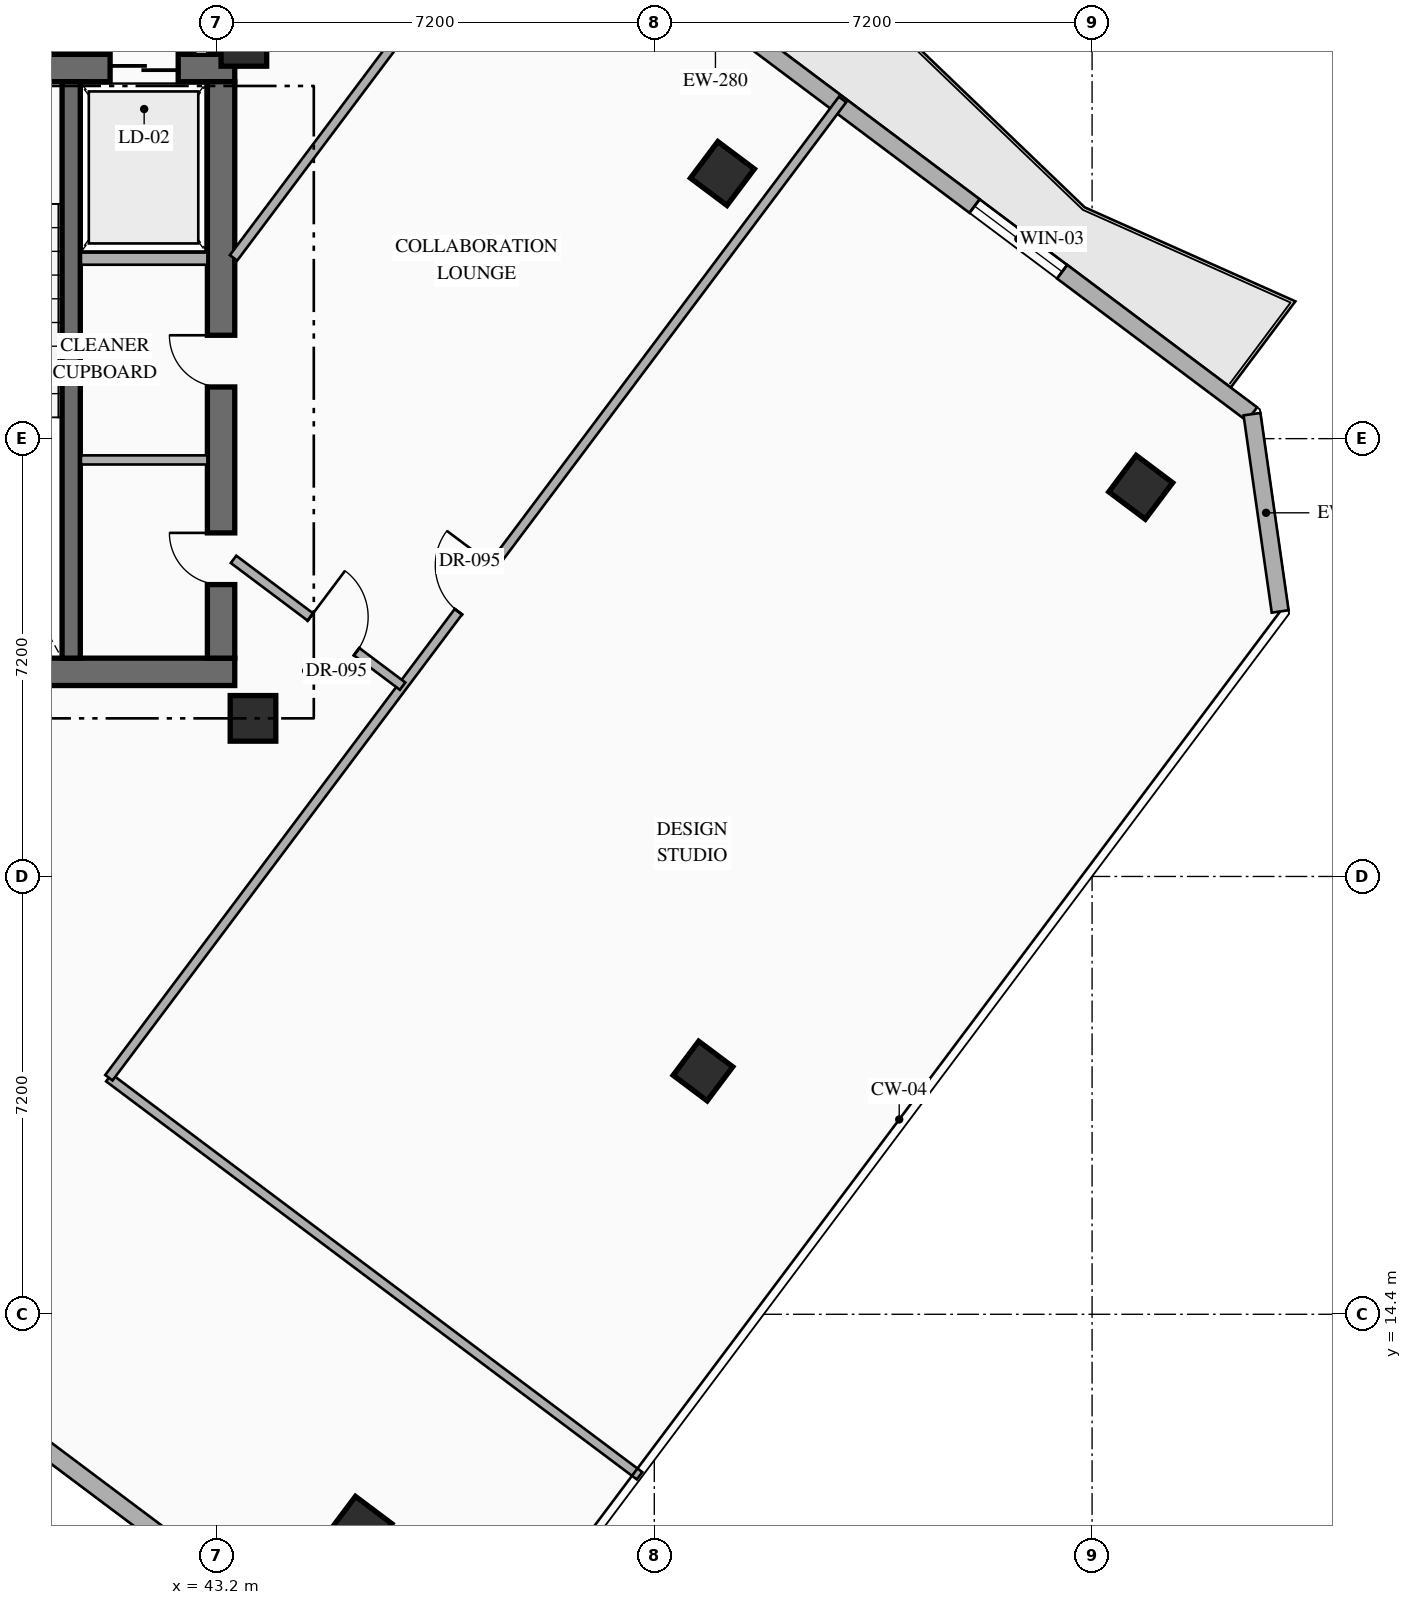
"""IFC4 building model, lengths in metres.
Left out: names, types, materials, properties, quantities, classifications, styles, units other than length and angle.
Written with IfcOpenShell. Run it as: python <this file> out.ifc"""

import sys

from ifc_helpers import new_model, si_unit, direction, frame, frame_2d, origin, origin_2d, place, context, subcontext, project, spatial, rectangle, hollow_rectangle, extrude, element, fill, save


model = new_model("IFC4")
c1 = context("Model", 3, precision=1e-05, world=origin(), true_north=direction((0.0, 1.0)))
c2 = subcontext(c1, "Body", "Model", "MODEL_VIEW")
j1 = project(units=[si_unit("LENGTHUNIT", "METRE"), si_unit("PLANEANGLEUNIT", "RADIAN")], contexts=[c1])
p1 = place(None, origin())
s1 = spatial("IfcSite", under=j1, at=p1, CompositionType="ELEMENT")
p2 = place(p1, origin())
s2 = spatial("IfcBuilding", under=s1, at=p2, CompositionType="ELEMENT")
p3 = place(p2, frame((0.0, 0.0, 191.55)))
s3 = spatial("IfcBuildingStorey", under=s2, at=p3, CompositionType="ELEMENT", Elevation=191.55)
p4 = place(p3, frame((36.04, 24.965, 0.0), z_axis=(0.0, 0.0, 1.0), x_axis=(1.0, 0.0, 0.0)))
e1 = element("IfcWall", 1, at=p4, inside=s3, PredefinedType="SHEAR", context=c2, shape_type="SweptSolid", body=[
    extrude(rectangle(XDim=7.46, YDim=0.45, at=frame_2d((3.73, 0.0))), origin(), (0.0, 0.0, 1.0), 3.6),
])
p5 = place(p3, frame((36.04, 34.895, 0.0), z_axis=(0.0, 0.0, 1.0), x_axis=(1.0, 0.0, 0.0)))
e2 = element("IfcWall", 2, at=p5, inside=s3, PredefinedType="SHEAR", context=c2, shape_type="SweptSolid", body=[
    extrude(rectangle(XDim=7.46, YDim=0.45, at=frame_2d((3.73, 0.0))), origin(), (0.0, 0.0, 1.0), 3.6),
])
p6 = place(p5, frame((2.51, 0.0, 0.0)))
e3 = element("IfcOpeningElement", 3, at=p6, cuts=e2, PredefinedType="OPENING", context=c2, shape_type="SweptSolid", body=[
    extrude(rectangle(XDim=1.1, YDim=2.2, at=frame_2d((0.55, 1.1))), frame((0.0, 0.235, 0.0), z_axis=(0.0, -1.0, 0.0), x_axis=(1.0, 0.0, 0.0)), (0.0, 0.0, 1.0), 0.47),
])
p7 = place(p5, frame((5.41, 0.0, 0.0)))
e4 = element("IfcOpeningElement", 4, at=p7, cuts=e2, PredefinedType="OPENING", context=c2, shape_type="SweptSolid", body=[
    extrude(rectangle(XDim=1.12, YDim=2.15, at=frame_2d((0.56, 1.075))), frame((0.0, 0.235, 0.0), z_axis=(0.0, -1.0, 0.0), x_axis=(1.0, 0.0, 0.0)), (0.0, 0.0, 1.0), 0.47),
])
p8 = place(p3, frame((43.275, 25.19, 0.0), z_axis=(0.0, 0.0, 1.0), x_axis=(0.0, 1.0, 0.0)))
e5 = element("IfcWall", 5, at=p8, inside=s3, PredefinedType="SHEAR", context=c2, shape_type="SweptSolid", body=[
    extrude(rectangle(XDim=9.48, YDim=0.45, at=frame_2d((4.74, 0.0))), origin(), (0.0, 0.0, 1.0), 3.6),
])
p9 = place(p8, frame((1.21, 0.0, 0.0)))
e6 = element("IfcOpeningElement", 6, at=p9, cuts=e5, PredefinedType="OPENING", context=c2, shape_type="SweptSolid", body=[
    extrude(rectangle(XDim=0.85, YDim=2.08, at=frame_2d((0.425, 1.04))), frame((0.0, 0.235, 0.0), z_axis=(0.0, -1.0, 0.0), x_axis=(1.0, 0.0, 0.0)), (0.0, 0.0, 1.0), 0.47),
])
p10 = place(p8, frame((4.46, 0.0, 0.0)))
e7 = element("IfcOpeningElement", 7, at=p10, cuts=e5, PredefinedType="OPENING", context=c2, shape_type="SweptSolid", body=[
    extrude(rectangle(XDim=0.85, YDim=2.08, at=frame_2d((0.425, 1.04))), frame((0.0, 0.235, 0.0), z_axis=(0.0, -1.0, 0.0), x_axis=(1.0, 0.0, 0.0)), (0.0, 0.0, 1.0), 0.47),
])
p11 = place(p3, frame((40.81, 25.19, 0.0), z_axis=(0.0, 0.0, 1.0), x_axis=(0.0, 1.0, 0.0)))
e8 = element("IfcWall", 8, at=p11, inside=s3, PredefinedType="SHEAR", context=c2, shape_type="SweptSolid", body=[
    extrude(rectangle(XDim=9.48, YDim=0.3, at=frame_2d((4.74, 0.0))), origin(), (0.0, 0.0, 1.0), 3.6),
])
for number, where, z_axis, x_axis in (
    (9, (43.8, 24.2, 0.0), (0.0, 0.0, 1.0), (1.0, 0.0, 0.0)),
    (10, (43.65, 35.3, 0.0), (0.0, 0.0, 1.0), (1.0, 0.0, 0.0)),
    (11, (51.52, 33.16, 0.0), (0.0, 0.0, 1.0), (0.8, -0.6, 0.0)),
    (12, (45.56, 10.88, 0.0), (0.0, 0.0, 1.0), (0.8, -0.6, 0.0)),
    (13, (58.4, 28.0, 0.0), (0.0, 0.0, 1.0), (0.8, -0.6, 0.0)),
):
    element("IfcColumn", number, at=place(p3, frame(where, z_axis=z_axis, x_axis=x_axis)), inside=s3, PredefinedType="COLUMN", context=c2, shape_type="SweptSolid", body=[
        extrude(hollow_rectangle(XDim=0.75, YDim=0.75, WallThickness=0.028, at=origin_2d()), origin(), (0.0, 0.0, 1.0), 3.6),
    ])
p12 = place(p3, frame((51.2, 18.4, 0.0), z_axis=(0.0, 0.0, 1.0), x_axis=(0.799999996291, -0.600000004945, 0.0)))
e14 = element("IfcColumn", 14, at=p12, inside=s3, PredefinedType="COLUMN", context=c2, shape_type="SweptSolid", body=[
    extrude(hollow_rectangle(XDim=0.7, YDim=0.7, WallThickness=0.028, at=origin_2d()), origin(), (0.0, 0.0, 1.0), 3.6),
])
p13 = place(p3, frame((44.86, 40.73, 0.0), z_axis=(0.0, 0.0, 1.0), x_axis=(0.800007624502, -0.599989833863, 0.0)))
e15 = element("IfcWall", 15, at=p13, inside=s3, PredefinedType="STANDARD", context=c2, shape_type="SweptSolid", body=[
    extrude(rectangle(XDim=19.212, YDim=0.28, at=frame_2d((9.606, 0.0))), origin(), (0.0, 0.0, 1.0), 3.35),
])
p14 = place(p13, frame((1.755, 0.0, 0.0)))
e16 = element("IfcOpeningElement", 16, at=p14, cuts=e15, PredefinedType="OPENING", context=c2, shape_type="SweptSolid", body=[
    extrude(rectangle(XDim=1.1, YDim=2.2, at=frame_2d((0.55, 1.1))), frame((0.0, 0.15, 0.0), z_axis=(0.0, -1.0, 0.0), x_axis=(1.0, 0.0, 0.0)), (0.0, 0.0, 1.0), 0.3),
])
p15 = place(p13, frame((13.509, 0.0, 0.85)))
e17 = element("IfcOpeningElement", 17, at=p15, cuts=e15, PredefinedType="OPENING", context=c2, shape_type="SweptSolid", body=[
    extrude(rectangle(XDim=1.8, YDim=2.1, at=frame_2d((0.9, 1.05))), frame((0.0, 0.15, 0.0), z_axis=(0.0, -1.0, 0.0), x_axis=(1.0, 0.0, 0.0)), (0.0, 0.0, 1.0), 0.3),
])
p16 = place(p3, frame((60.23, 29.203, 0.0), z_axis=(0.0, 0.0, 1.0), x_axis=(0.141296221922, -0.989967361922, 0.0)))
e18 = element("IfcWall", 18, at=p16, inside=s3, PredefinedType="STANDARD", context=c2, shape_type="SweptSolid", body=[
    extrude(rectangle(XDim=3.278, YDim=0.28, at=frame_2d((1.639, 0.0))), origin(), (0.0, 0.0, 1.0), 3.35),
])
p17 = place(p3, frame((44.918, 8.787, 0.0), z_axis=(0.0, 0.0, 1.0), x_axis=(-0.800004765927, 0.599993645378, 0.0)))
e19 = element("IfcWall", 19, at=p17, inside=s3, PredefinedType="STANDARD", context=c2, shape_type="SweptSolid", body=[
    extrude(rectangle(XDim=24.588, YDim=0.28, at=frame_2d((12.294, 0.0))), origin(), (0.0, 0.0, 1.0), 3.35),
])
p18 = place(p3, frame((40.97, 31.76, 0.0), z_axis=(0.0, 0.0, 1.0), x_axis=(1.0, 0.0, 0.0)))
e20 = element("IfcWall", 20, at=p18, inside=s3, PredefinedType="STANDARD", context=c2, shape_type="SweptSolid", body=[
    extrude(rectangle(XDim=2.08, YDim=0.2, at=frame_2d((1.04, 0.0))), origin(), (0.0, 0.0, 1.0), 3.35),
])
p19 = place(p3, frame((40.97, 28.45, 0.0), z_axis=(0.0, 0.0, 1.0), x_axis=(1.0, 0.0, 0.0)))
e21 = element("IfcWall", 21, at=p19, inside=s3, PredefinedType="PARTITIONING", context=c2, shape_type="SweptSolid", body=[
    extrude(rectangle(XDim=2.08, YDim=0.15, at=frame_2d((1.04, 0.0))), origin(), (0.0, 0.0, 1.0), 3.35),
])
p20 = place(p3, frame((42.95, 35.12, 0.0), z_axis=(0.0, 0.0, 1.0), x_axis=(0.0, 1.0, 0.0)))
e22 = element("IfcWall", 22, at=p20, inside=s3, PredefinedType="STANDARD", context=c2, shape_type="SweptSolid", body=[
    extrude(rectangle(XDim=2.98, YDim=0.2, at=frame_2d((1.49, 0.0))), origin(), (0.0, 0.0, 1.0), 3.35),
])
p21 = place(p3, frame((41.43, 18.29, 0.0), z_axis=(0.0, 0.0, 1.0), x_axis=(0.799994629375, -0.600007160767, 0.0)))
e23 = element("IfcWall", 23, at=p21, inside=s3, PredefinedType="PARTITIONING", context=c2, shape_type="SweptSolid", body=[
    extrude(rectangle(XDim=10.91, YDim=0.15, at=frame_2d((5.455, 0.0))), origin(), (0.0, 0.0, 1.0), 3.35),
])
p22 = place(p3, frame((41.43, 18.29, 0.0), z_axis=(0.0, 0.0, 1.0), x_axis=(0.600007769734, 0.79999417264, 0.0)))
e24 = element("IfcWall", 24, at=p22, inside=s3, PredefinedType="PARTITIONING", context=c2, shape_type="SweptSolid", body=[
    extrude(rectangle(XDim=20.11, YDim=0.15, at=frame_2d((10.055, 0.0))), origin(), (0.0, 0.0, 1.0), 3.35),
])
p23 = place(p22, frame((9.58, 0.0, 0.0)))
e25 = element("IfcOpeningElement", 25, at=p23, cuts=e24, PredefinedType="OPENING", context=c2, shape_type="SweptSolid", body=[
    extrude(rectangle(XDim=0.95, YDim=2.15, at=frame_2d((0.475, 1.075))), frame((0.0, 0.085, 0.0), z_axis=(0.0, -1.0, 0.0), x_axis=(1.0, 0.0, 0.0)), (0.0, 0.0, 1.0), 0.17),
])
p24 = place(p3, frame((43.48, 26.815, 0.0), z_axis=(0.0, 0.0, 1.0), x_axis=(0.800008430676, -0.599988758934, 0.0)))
e26 = element("IfcWall", 26, at=p24, inside=s3, PredefinedType="PARTITIONING", context=c2, shape_type="SweptSolid", body=[
    extrude(rectangle(XDim=3.475, YDim=0.15, at=frame_2d((1.738, 0.0))), origin(), (0.0, 0.0, 1.0), 3.35),
])
p25 = place(p24, frame((1.58, 0.0, 0.0)))
e27 = element("IfcOpeningElement", 27, at=p25, cuts=e26, PredefinedType="OPENING", context=c2, shape_type="SweptSolid", body=[
    extrude(rectangle(XDim=0.95, YDim=2.15, at=frame_2d((0.475, 1.075))), frame((0.0, 0.085, 0.0), z_axis=(0.0, -1.0, 0.0), x_axis=(1.0, 0.0, 0.0)), (0.0, 0.0, 1.0), 0.17),
])
p26 = place(p3, frame((43.48, 31.773, 0.0), z_axis=(0.0, 0.0, 1.0), x_axis=(0.599971041729, 0.800021717885, 0.0)))
e28 = element("IfcWall", 28, at=p26, inside=s3, PredefinedType="PARTITIONING", context=c2, shape_type="SweptSolid", body=[
    extrude(rectangle(XDim=8.094, YDim=0.15, at=frame_2d((4.047, 0.0))), origin(), (0.0, 0.0, 1.0), 3.35),
])
p27 = place(p15, origin())
e29 = element("IfcWindow", 29, at=p27, inside=s3, PartitioningType="SINGLE_PANEL", PredefinedType="WINDOW", context=c2, shape_type="SweptSolid", body=[
    extrude(rectangle(XDim=1.8, YDim=2.1, at=frame_2d((0.9, 1.05))), frame((0.0, 0.03, 0.0), z_axis=(0.0, -1.0, 0.0), x_axis=(1.0, 0.0, 0.0)), (0.0, 0.0, 1.0), 0.06),
])
fill(e17, e29)
p28 = place(p7, origin())
e30 = element("IfcDoor", 30, at=p28, inside=s3, OperationType="SLIDING_TO_RIGHT", PredefinedType="USERDEFINED", context=c2, shape_type="SweptSolid", body=[
    extrude(rectangle(XDim=1.12, YDim=2.15, at=frame_2d((0.56, 1.075))), frame((0.0, 0.025, 0.0), z_axis=(0.0, -1.0, 0.0), x_axis=(1.0, 0.0, 0.0)), (0.0, 0.0, 1.0), 0.05),
])
fill(e4, e30)
p29 = place(p9, origin())
e31 = element("IfcDoor", 31, at=p29, inside=s3, OperationType="SINGLE_SWING_RIGHT", PredefinedType="DOOR", context=c2, shape_type="SweptSolid", body=[
    extrude(rectangle(XDim=0.85, YDim=2.08, at=frame_2d((0.425, 1.04))), frame((0.0, 0.025, 0.0), z_axis=(0.0, -1.0, 0.0), x_axis=(1.0, 0.0, 0.0)), (0.0, 0.0, 1.0), 0.05),
])
fill(e6, e31)
p30 = place(p10, origin())
e32 = element("IfcDoor", 32, at=p30, inside=s3, OperationType="SINGLE_SWING_RIGHT", PredefinedType="DOOR", context=c2, shape_type="SweptSolid", body=[
    extrude(rectangle(XDim=0.85, YDim=2.08, at=frame_2d((0.425, 1.04))), frame((0.0, 0.025, 0.0), z_axis=(0.0, -1.0, 0.0), x_axis=(1.0, 0.0, 0.0)), (0.0, 0.0, 1.0), 0.05),
])
fill(e7, e32)
p31 = place(p23, origin())
e33 = element("IfcDoor", 33, at=p31, inside=s3, OperationType="SINGLE_SWING_RIGHT", PredefinedType="DOOR", context=c2, shape_type="SweptSolid", body=[
    extrude(rectangle(XDim=0.95, YDim=2.15, at=frame_2d((0.475, 1.075))), frame((0.0, 0.025, 0.0), z_axis=(0.0, -1.0, 0.0), x_axis=(1.0, 0.0, 0.0)), (0.0, 0.0, 1.0), 0.05),
])
fill(e25, e33)
p32 = place(p25, origin())
e34 = element("IfcDoor", 34, at=p32, inside=s3, OperationType="SINGLE_SWING_LEFT", PredefinedType="DOOR", context=c2, shape_type="SweptSolid", body=[
    extrude(rectangle(XDim=0.95, YDim=2.15, at=frame_2d((0.475, 1.075))), frame((0.0, 0.025, 0.0), z_axis=(0.0, -1.0, 0.0), x_axis=(1.0, 0.0, 0.0)), (0.0, 0.0, 1.0), 0.05),
])
fill(e27, e34)
save(model, sys.argv[1])
